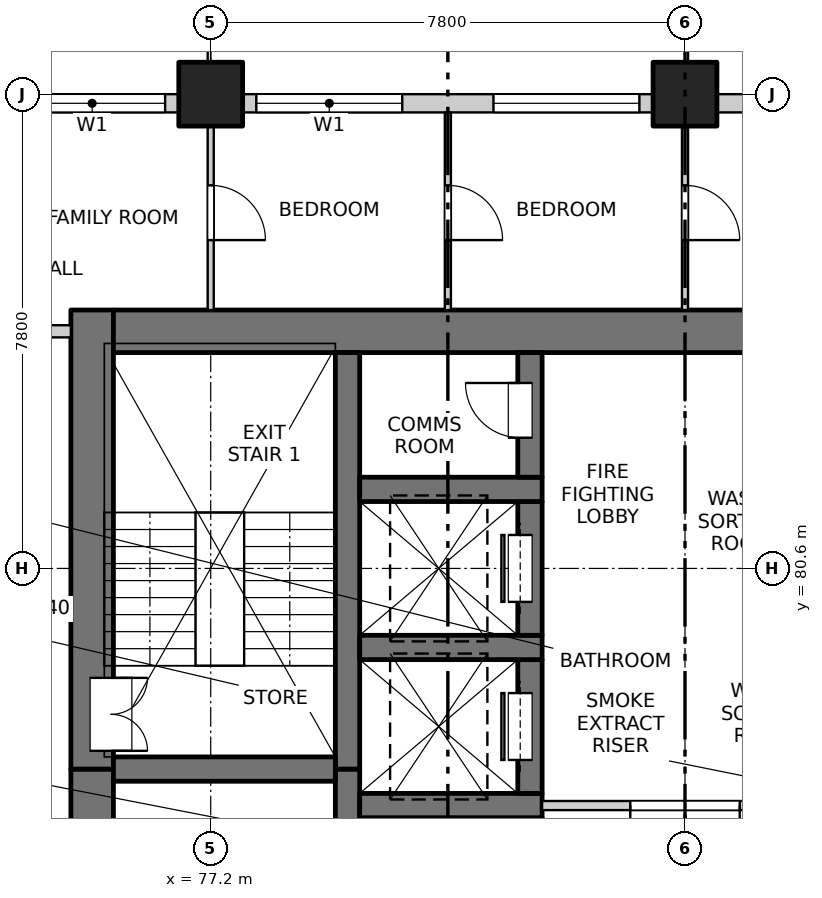
"""IFC4 building model, lengths in metres.
Left out: names, types, materials, properties, quantities, classifications, styles, units other than length and angle.
Written with IfcOpenShell. Run it as: python <this file> out.ifc"""

import sys

from ifc_helpers import new_model, si_unit, direction, frame, frame_2d, origin, origin_2d, place, context, subcontext, project, spatial, rectangle, extrude, element, fill, save


model = new_model("IFC4")
c1 = context("Model", 3, precision=1e-05, world=origin(), true_north=direction((0.0, 1.0)))
c2 = subcontext(c1, "Body", "Model", "MODEL_VIEW")
j1 = project(units=[si_unit("LENGTHUNIT", "METRE"), si_unit("PLANEANGLEUNIT", "RADIAN")], contexts=[c1])
p1 = place(None, origin())
s1 = spatial("IfcSite", under=j1, at=p1, CompositionType="ELEMENT")
p2 = place(p1, origin())
s2 = spatial("IfcBuilding", under=s1, at=p2, CompositionType="ELEMENT")
p3 = place(p2, frame((0.0, 0.0, 36.5)))
s3 = spatial("IfcBuildingStorey", under=s2, at=p3, CompositionType="ELEMENT", Elevation=36.5)
for number, where, z_axis, x_axis in (
    (1, (77.2, 88.4, -0.25), (0.0, 0.0, 1.0), (1.0, 0.0, 0.0)),
    (2, (85.0, 88.4, -0.25), (0.0, 0.0, 1.0), (1.0, 0.0, 0.0)),
):
    element("IfcColumn", number, at=place(p3, frame(where, z_axis=z_axis, x_axis=x_axis)), inside=s3, PredefinedType="COLUMN", context=c2, shape_type="SweptSolid", body=[
        extrude(rectangle(XDim=1.05, YDim=1.05, at=origin_2d()), origin(), (0.0, 0.0, 1.0), 3.4),
    ])
p4 = place(p3, frame((75.25, 54.9, -0.25), z_axis=(0.0, 0.0, 1.0), x_axis=(0.0, 1.0, 0.0)))
e3 = element("IfcWall", 3, at=p4, inside=s3, PredefinedType="SOLIDWALL", context=c2, shape_type="SweptSolid", body=[
    extrude(rectangle(XDim=22.4, YDim=0.7, at=frame_2d((11.2, 0.0))), origin(), (0.0, 0.0, 1.0), 3.4),
])
p5 = place(p4, frame((7.55, 0.0, 0.25)))
e4 = element("IfcOpeningElement", 4, at=p5, cuts=e3, PredefinedType="OPENING", context=c2, shape_type="SweptSolid", body=[
    extrude(rectangle(XDim=0.9, YDim=2.1, at=frame_2d((0.45, 1.05))), frame((0.0, 0.36, 0.0), z_axis=(0.0, -1.0, 0.0), x_axis=(1.0, 0.0, 0.0)), (0.0, 0.0, 1.0), 0.72),
])
p6 = place(p4, frame((10.85, 0.0, 0.25)))
e5 = element("IfcOpeningElement", 5, at=p6, cuts=e3, PredefinedType="OPENING", context=c2, shape_type="SweptSolid", body=[
    extrude(rectangle(XDim=0.9, YDim=2.1, at=frame_2d((0.45, 1.05))), frame((0.0, 0.36, 0.0), z_axis=(0.0, -1.0, 0.0), x_axis=(1.0, 0.0, 0.0)), (0.0, 0.0, 1.0), 0.72),
])
p7 = place(p4, frame((13.85, 0.0, 0.25)))
e6 = element("IfcOpeningElement", 6, at=p7, cuts=e3, PredefinedType="OPENING", context=c2, shape_type="SweptSolid", body=[
    extrude(rectangle(XDim=0.9, YDim=2.1, at=frame_2d((0.45, 1.05))), frame((0.0, 0.36, 0.0), z_axis=(0.0, -1.0, 0.0), x_axis=(1.0, 0.0, 0.0)), (0.0, 0.0, 1.0), 0.72),
])
p8 = place(p4, frame((16.85, 0.0, 0.25)))
e7 = element("IfcOpeningElement", 7, at=p8, cuts=e3, PredefinedType="OPENING", context=c2, shape_type="SweptSolid", body=[
    extrude(rectangle(XDim=0.9, YDim=2.1, at=frame_2d((0.45, 1.05))), frame((0.0, 0.36, 0.0), z_axis=(0.0, -1.0, 0.0), x_axis=(1.0, 0.0, 0.0)), (0.0, 0.0, 1.0), 0.72),
])
p9 = place(p4, frame((20.15, 0.0, 0.25)))
e8 = element("IfcOpeningElement", 8, at=p9, cuts=e3, PredefinedType="OPENING", context=c2, shape_type="SweptSolid", body=[
    extrude(rectangle(XDim=0.9, YDim=2.1, at=frame_2d((0.45, 1.05))), frame((0.0, 0.36, 0.0), z_axis=(0.0, -1.0, 0.0), x_axis=(1.0, 0.0, 0.0)), (0.0, 0.0, 1.0), 0.72),
])
p10 = place(p3, frame((75.25, 77.3, -0.25), z_axis=(0.0, 0.0, 1.0), x_axis=(0.0, 1.0, 0.0)))
e9 = element("IfcWall", 9, at=p10, inside=s3, PredefinedType="SOLIDWALL", context=c2, shape_type="SweptSolid", body=[
    extrude(rectangle(XDim=7.55, YDim=0.7, at=frame_2d((3.775, 0.0))), origin(), (0.0, 0.0, 1.0), 3.4),
])
p11 = place(p10, frame((0.3, 0.0, 0.25)))
e10 = element("IfcOpeningElement", 10, at=p11, cuts=e9, PredefinedType="OPENING", context=c2, shape_type="SweptSolid", body=[
    extrude(rectangle(XDim=1.2, YDim=2.1, at=frame_2d((0.6, 1.05))), frame((0.0, 0.36, 0.0), z_axis=(0.0, -1.0, 0.0), x_axis=(1.0, 0.0, 0.0)), (0.0, 0.0, 1.0), 0.72),
])
p12 = place(p3, frame((75.6, 84.5, -0.25), z_axis=(0.0, 0.0, 1.0), x_axis=(1.0, 0.0, 0.0)))
e11 = element("IfcWall", 11, at=p12, inside=s3, PredefinedType="SOLIDWALL", context=c2, shape_type="SweptSolid", body=[
    extrude(rectangle(XDim=18.8, YDim=0.7, at=frame_2d((9.4, 0.0))), origin(), (0.0, 0.0, 1.0), 3.4),
])
p13 = place(p3, frame((79.45, 60.9, -0.25), z_axis=(0.0, 0.0, 1.0), x_axis=(0.0, 1.0, 0.0)))
e12 = element("IfcWall", 12, at=p13, inside=s3, PredefinedType="SOLIDWALL", context=c2, shape_type="SweptSolid", body=[
    extrude(rectangle(XDim=16.4, YDim=0.4, at=frame_2d((8.2, 0.0))), origin(), (0.0, 0.0, 1.0), 3.4),
])
p14 = place(p3, frame((79.45, 77.3, -0.25), z_axis=(0.0, 0.0, 1.0), x_axis=(0.0, 1.0, 0.0)))
e13 = element("IfcWall", 13, at=p14, inside=s3, PredefinedType="SOLIDWALL", context=c2, shape_type="SweptSolid", body=[
    extrude(rectangle(XDim=6.85, YDim=0.4, at=frame_2d((3.425, 0.0))), origin(), (0.0, 0.0, 1.0), 3.4),
])
p15 = place(p3, frame((82.45, 74.3, -0.25), z_axis=(0.0, 0.0, 1.0), x_axis=(0.0, 1.0, 0.0)))
e14 = element("IfcWall", 14, at=p15, inside=s3, PredefinedType="SOLIDWALL", context=c2, shape_type="SweptSolid", body=[
    extrude(rectangle(XDim=2.2, YDim=0.4, at=frame_2d((1.1, 0.0))), origin(), (0.0, 0.0, 1.0), 3.4),
])
p16 = place(p15, frame((0.55, 0.0, 0.25)))
e15 = element("IfcOpeningElement", 15, at=p16, cuts=e14, PredefinedType="OPENING", context=c2, shape_type="SweptSolid", body=[
    extrude(rectangle(XDim=1.1, YDim=2.1, at=frame_2d((0.55, 1.05))), frame((0.0, 0.21, 0.0), z_axis=(0.0, -1.0, 0.0), x_axis=(1.0, 0.0, 0.0)), (0.0, 0.0, 1.0), 0.42),
])
p17 = place(p3, frame((79.65, 76.7, -0.25), z_axis=(0.0, 0.0, 1.0), x_axis=(1.0, 0.0, 0.0)))
e16 = element("IfcWall", 16, at=p17, inside=s3, PredefinedType="SOLIDWALL", context=c2, shape_type="SweptSolid", body=[
    extrude(rectangle(XDim=3.0, YDim=0.4, at=frame_2d((1.5, 0.0))), origin(), (0.0, 0.0, 1.0), 3.4),
])
p18 = place(p3, frame((82.45, 76.9, -0.25), z_axis=(0.0, 0.0, 1.0), x_axis=(0.0, 1.0, 0.0)))
e17 = element("IfcWall", 17, at=p18, inside=s3, PredefinedType="SOLIDWALL", context=c2, shape_type="SweptSolid", body=[
    extrude(rectangle(XDim=2.2, YDim=0.4, at=frame_2d((1.1, 0.0))), origin(), (0.0, 0.0, 1.0), 3.4),
])
p19 = place(p18, frame((0.55, 0.0, 0.25)))
e18 = element("IfcOpeningElement", 18, at=p19, cuts=e17, PredefinedType="OPENING", context=c2, shape_type="SweptSolid", body=[
    extrude(rectangle(XDim=1.1, YDim=2.1, at=frame_2d((0.55, 1.05))), frame((0.0, 0.21, 0.0), z_axis=(0.0, -1.0, 0.0), x_axis=(1.0, 0.0, 0.0)), (0.0, 0.0, 1.0), 0.42),
])
p20 = place(p3, frame((79.65, 79.3, -0.25), z_axis=(0.0, 0.0, 1.0), x_axis=(1.0, 0.0, 0.0)))
e19 = element("IfcWall", 19, at=p20, inside=s3, PredefinedType="SOLIDWALL", context=c2, shape_type="SweptSolid", body=[
    extrude(rectangle(XDim=3.0, YDim=0.4, at=frame_2d((1.5, 0.0))), origin(), (0.0, 0.0, 1.0), 3.4),
])
p21 = place(p3, frame((82.45, 79.5, -0.25), z_axis=(0.0, 0.0, 1.0), x_axis=(0.0, 1.0, 0.0)))
e20 = element("IfcWall", 20, at=p21, inside=s3, PredefinedType="SOLIDWALL", context=c2, shape_type="SweptSolid", body=[
    extrude(rectangle(XDim=2.2, YDim=0.4, at=frame_2d((1.1, 0.0))), origin(), (0.0, 0.0, 1.0), 3.4),
])
p22 = place(p21, frame((0.55, 0.0, 0.25)))
e21 = element("IfcOpeningElement", 21, at=p22, cuts=e20, PredefinedType="OPENING", context=c2, shape_type="SweptSolid", body=[
    extrude(rectangle(XDim=1.1, YDim=2.1, at=frame_2d((0.55, 1.05))), frame((0.0, 0.21, 0.0), z_axis=(0.0, -1.0, 0.0), x_axis=(1.0, 0.0, 0.0)), (0.0, 0.0, 1.0), 0.42),
])
p23 = place(p3, frame((79.65, 81.9, -0.25), z_axis=(0.0, 0.0, 1.0), x_axis=(1.0, 0.0, 0.0)))
e22 = element("IfcWall", 22, at=p23, inside=s3, PredefinedType="SOLIDWALL", context=c2, shape_type="SweptSolid", body=[
    extrude(rectangle(XDim=3.0, YDim=0.4, at=frame_2d((1.5, 0.0))), origin(), (0.0, 0.0, 1.0), 3.4),
])
p24 = place(p3, frame((82.45, 82.1, -0.25), z_axis=(0.0, 0.0, 1.0), x_axis=(0.0, 1.0, 0.0)))
e23 = element("IfcWall", 23, at=p24, inside=s3, PredefinedType="SOLIDWALL", context=c2, shape_type="SweptSolid", body=[
    extrude(rectangle(XDim=2.05, YDim=0.4, at=frame_2d((1.025, 0.0))), origin(), (0.0, 0.0, 1.0), 3.4),
])
p25 = place(p24, frame((0.65, 0.0, 0.25)))
e24 = element("IfcOpeningElement", 24, at=p25, cuts=e23, PredefinedType="OPENING", context=c2, shape_type="SweptSolid", body=[
    extrude(rectangle(XDim=0.9, YDim=2.1, at=frame_2d((0.45, 1.05))), frame((0.0, 0.21, 0.0), z_axis=(0.0, -1.0, 0.0), x_axis=(1.0, 0.0, 0.0)), (0.0, 0.0, 1.0), 0.42),
])
p26 = place(p3, frame((75.6, 77.3, -0.25), z_axis=(0.0, 0.0, 1.0), x_axis=(1.0, 0.0, 0.0)))
e25 = element("IfcWall", 25, at=p26, inside=s3, PredefinedType="SOLIDWALL", context=c2, shape_type="SweptSolid", body=[
    extrude(rectangle(XDim=3.65, YDim=0.4, at=frame_2d((1.825, 0.0))), origin(), (0.0, 0.0, 1.0), 3.4),
])
p27 = place(p3, frame((69.925, 88.25, 0.0), z_axis=(0.0, 0.0, 1.0), x_axis=(1.0, 0.0, 0.0)))
e26 = element("IfcWall", 26, at=p27, inside=s3, PredefinedType="SOLIDWALL", context=c2, shape_type="SweptSolid", body=[
    extrude(rectangle(XDim=6.75, YDim=0.3, at=frame_2d((3.375, 0.0))), origin(), (0.0, 0.0, 1.0), 2.7),
])
p28 = place(p27, frame((0.525, 0.0, 0.0)))
e27 = element("IfcOpeningElement", 27, at=p28, cuts=e26, PredefinedType="OPENING", context=c2, shape_type="SweptSolid", body=[
    extrude(rectangle(XDim=1.8, YDim=2.4, at=frame_2d((0.9, 1.2))), frame((0.0, 0.16, 0.0), z_axis=(0.0, -1.0, 0.0), x_axis=(1.0, 0.0, 0.0)), (0.0, 0.0, 1.0), 0.32),
])
p29 = place(p27, frame((4.125, 0.0, 0.9)))
e28 = element("IfcOpeningElement", 28, at=p29, cuts=e26, PredefinedType="OPENING", context=c2, shape_type="SweptSolid", body=[
    extrude(rectangle(XDim=2.4, YDim=1.8, at=frame_2d((1.2, 0.9))), frame((0.0, 0.16, 0.0), z_axis=(0.0, -1.0, 0.0), x_axis=(1.0, 0.0, 0.0)), (0.0, 0.0, 1.0), 0.32),
])
p30 = place(p3, frame((77.725, 88.25, 0.0), z_axis=(0.0, 0.0, 1.0), x_axis=(1.0, 0.0, 0.0)))
e29 = element("IfcWall", 29, at=p30, inside=s3, PredefinedType="SOLIDWALL", context=c2, shape_type="SweptSolid", body=[
    extrude(rectangle(XDim=6.75, YDim=0.3, at=frame_2d((3.375, 0.0))), origin(), (0.0, 0.0, 1.0), 2.7),
])
p31 = place(p30, frame((0.225, 0.0, 0.9)))
e30 = element("IfcOpeningElement", 30, at=p31, cuts=e29, PredefinedType="OPENING", context=c2, shape_type="SweptSolid", body=[
    extrude(rectangle(XDim=2.4, YDim=1.8, at=frame_2d((1.2, 0.9))), frame((0.0, 0.16, 0.0), z_axis=(0.0, -1.0, 0.0), x_axis=(1.0, 0.0, 0.0)), (0.0, 0.0, 1.0), 0.32),
])
p32 = place(p30, frame((4.125, 0.0, 0.9)))
e31 = element("IfcOpeningElement", 31, at=p32, cuts=e29, PredefinedType="OPENING", context=c2, shape_type="SweptSolid", body=[
    extrude(rectangle(XDim=2.4, YDim=1.8, at=frame_2d((1.2, 0.9))), frame((0.0, 0.16, 0.0), z_axis=(0.0, -1.0, 0.0), x_axis=(1.0, 0.0, 0.0)), (0.0, 0.0, 1.0), 0.32),
])
p33 = place(p3, frame((85.525, 88.25, 0.0), z_axis=(0.0, 0.0, 1.0), x_axis=(1.0, 0.0, 0.0)))
e32 = element("IfcWall", 32, at=p33, inside=s3, PredefinedType="SOLIDWALL", context=c2, shape_type="SweptSolid", body=[
    extrude(rectangle(XDim=6.75, YDim=0.3, at=frame_2d((3.375, 0.0))), origin(), (0.0, 0.0, 1.0), 2.7),
])
p34 = place(p33, frame((0.525, 0.0, 0.0)))
e33 = element("IfcOpeningElement", 33, at=p34, cuts=e32, PredefinedType="OPENING", context=c2, shape_type="SweptSolid", body=[
    extrude(rectangle(XDim=1.8, YDim=2.4, at=frame_2d((0.9, 1.2))), frame((0.0, 0.16, 0.0), z_axis=(0.0, -1.0, 0.0), x_axis=(1.0, 0.0, 0.0)), (0.0, 0.0, 1.0), 0.32),
])
p35 = place(p33, frame((4.125, 0.0, 0.9)))
e34 = element("IfcOpeningElement", 34, at=p35, cuts=e32, PredefinedType="OPENING", context=c2, shape_type="SweptSolid", body=[
    extrude(rectangle(XDim=2.4, YDim=1.8, at=frame_2d((1.2, 0.9))), frame((0.0, 0.16, 0.0), z_axis=(0.0, -1.0, 0.0), x_axis=(1.0, 0.0, 0.0)), (0.0, 0.0, 1.0), 0.32),
])
p36 = place(p3, frame((82.65, 76.7, 0.0), z_axis=(0.0, 0.0, 1.0), x_axis=(1.0, 0.0, 0.0)))
e35 = element("IfcWall", 35, at=p36, inside=s3, PredefinedType="PARTITIONING", context=c2, shape_type="SweptSolid", body=[
    extrude(rectangle(XDim=4.7, YDim=0.15, at=frame_2d((2.35, 0.0))), origin(), (0.0, 0.0, 1.0), 3.15),
])
p37 = place(p36, frame((1.45, 0.0, 0.0)))
e36 = element("IfcOpeningElement", 36, at=p37, cuts=e35, PredefinedType="OPENING", context=c2, shape_type="SweptSolid", body=[
    extrude(rectangle(XDim=1.8, YDim=2.1, at=frame_2d((0.9, 1.05))), frame((0.0, 0.085, 0.0), z_axis=(0.0, -1.0, 0.0), x_axis=(1.0, 0.0, 0.0)), (0.0, 0.0, 1.0), 0.17),
])
p38 = place(p3, frame((73.2, 84.5, 0.0), z_axis=(0.0, 0.0, 1.0), x_axis=(1.0, 0.0, 0.0)))
e37 = element("IfcWall", 37, at=p38, inside=s3, PredefinedType="PARTITIONING", context=c2, shape_type="SweptSolid", body=[
    extrude(rectangle(XDim=1.7, YDim=0.2, at=frame_2d((0.85, 0.0))), origin(), (0.0, 0.0, 1.0), 3.15),
])
p39 = place(p3, frame((77.2, 84.85, 0.0), z_axis=(0.0, 0.0, 1.0), x_axis=(0.0, 1.0, 0.0)))
e38 = element("IfcWall", 38, at=p39, inside=s3, PredefinedType="PARTITIONING", context=c2, shape_type="SweptSolid", body=[
    extrude(rectangle(XDim=3.25, YDim=0.1, at=frame_2d((1.625, 0.0))), origin(), (0.0, 0.0, 1.0), 3.15),
])
p40 = place(p39, frame((1.15, 0.0, 0.0)))
e39 = element("IfcOpeningElement", 39, at=p40, cuts=e38, PredefinedType="OPENING", context=c2, shape_type="SweptSolid", body=[
    extrude(rectangle(XDim=0.9, YDim=2.1, at=frame_2d((0.45, 1.05))), frame((0.0, 0.06, 0.0), z_axis=(0.0, -1.0, 0.0), x_axis=(1.0, 0.0, 0.0)), (0.0, 0.0, 1.0), 0.12),
])
p41 = place(p3, frame((81.1, 84.85, 0.0), z_axis=(0.0, 0.0, 1.0), x_axis=(0.0, 1.0, 0.0)))
e40 = element("IfcWall", 40, at=p41, inside=s3, PredefinedType="PARTITIONING", context=c2, shape_type="SweptSolid", body=[
    extrude(rectangle(XDim=3.25, YDim=0.1, at=frame_2d((1.625, 0.0))), origin(), (0.0, 0.0, 1.0), 3.15),
])
p42 = place(p41, frame((1.15, 0.0, 0.0)))
e41 = element("IfcOpeningElement", 41, at=p42, cuts=e40, PredefinedType="OPENING", context=c2, shape_type="SweptSolid", body=[
    extrude(rectangle(XDim=0.9, YDim=2.1, at=frame_2d((0.45, 1.05))), frame((0.0, 0.06, 0.0), z_axis=(0.0, -1.0, 0.0), x_axis=(1.0, 0.0, 0.0)), (0.0, 0.0, 1.0), 0.12),
])
p43 = place(p3, frame((85.0, 84.85, 0.0), z_axis=(0.0, 0.0, 1.0), x_axis=(0.0, 1.0, 0.0)))
e42 = element("IfcWall", 42, at=p43, inside=s3, PredefinedType="PARTITIONING", context=c2, shape_type="SweptSolid", body=[
    extrude(rectangle(XDim=3.25, YDim=0.1, at=frame_2d((1.625, 0.0))), origin(), (0.0, 0.0, 1.0), 3.15),
])
p44 = place(p43, frame((1.15, 0.0, 0.0)))
e43 = element("IfcOpeningElement", 43, at=p44, cuts=e42, PredefinedType="OPENING", context=c2, shape_type="SweptSolid", body=[
    extrude(rectangle(XDim=0.9, YDim=2.1, at=frame_2d((0.45, 1.05))), frame((0.0, 0.06, 0.0), z_axis=(0.0, -1.0, 0.0), x_axis=(1.0, 0.0, 0.0)), (0.0, 0.0, 1.0), 0.12),
])
p45 = place(p29, origin())
e44 = element("IfcWindow", 44, at=p45, inside=s3, PartitioningType="DOUBLE_PANEL_VERTICAL", PredefinedType="WINDOW", context=c2, shape_type="SweptSolid", body=[
    extrude(rectangle(XDim=2.4, YDim=1.8, at=frame_2d((1.2, 0.9))), frame((0.0, 0.03, 0.0), z_axis=(0.0, -1.0, 0.0), x_axis=(1.0, 0.0, 0.0)), (0.0, 0.0, 1.0), 0.06),
])
fill(e28, e44)
p46 = place(p31, origin())
e45 = element("IfcWindow", 45, at=p46, inside=s3, PartitioningType="DOUBLE_PANEL_VERTICAL", PredefinedType="WINDOW", context=c2, shape_type="SweptSolid", body=[
    extrude(rectangle(XDim=2.4, YDim=1.8, at=frame_2d((1.2, 0.9))), frame((0.0, 0.03, 0.0), z_axis=(0.0, -1.0, 0.0), x_axis=(1.0, 0.0, 0.0)), (0.0, 0.0, 1.0), 0.06),
])
fill(e30, e45)
p47 = place(p32, origin())
e46 = element("IfcWindow", 46, at=p47, inside=s3, PartitioningType="DOUBLE_PANEL_VERTICAL", PredefinedType="WINDOW", context=c2, shape_type="SweptSolid", body=[
    extrude(rectangle(XDim=2.4, YDim=1.8, at=frame_2d((1.2, 0.9))), frame((0.0, 0.03, 0.0), z_axis=(0.0, -1.0, 0.0), x_axis=(1.0, 0.0, 0.0)), (0.0, 0.0, 1.0), 0.06),
])
fill(e31, e46)
p48 = place(p37, origin())
e47 = element("IfcDoor", 47, at=p48, inside=s3, OperationType="DOUBLE_DOOR_SINGLE_SWING", PredefinedType="DOOR", context=c2, shape_type="SweptSolid", body=[
    extrude(rectangle(XDim=1.8, YDim=2.1, at=frame_2d((0.9, 1.05))), frame((0.0, 0.025, 0.0), z_axis=(0.0, -1.0, 0.0), x_axis=(1.0, 0.0, 0.0)), (0.0, 0.0, 1.0), 0.05),
])
fill(e36, e47)
p49 = place(p19, origin())
e48 = element("IfcDoor", 48, at=p49, inside=s3, OperationType="SLIDING_TO_LEFT", PredefinedType="DOOR", context=c2, shape_type="SweptSolid", body=[
    extrude(rectangle(XDim=1.1, YDim=2.1, at=frame_2d((0.55, 1.05))), frame((0.0, 0.185, 0.0), z_axis=(0.0, -1.0, 0.0), x_axis=(1.0, 0.0, 0.0)), (0.0, 0.0, 1.0), 0.05),
])
fill(e18, e48)
p50 = place(p11, origin())
e49 = element("IfcDoor", 49, at=p50, inside=s3, OperationType="DOUBLE_DOOR_SINGLE_SWING", PredefinedType="DOOR", context=c2, shape_type="SweptSolid", body=[
    extrude(rectangle(XDim=1.2, YDim=2.1, at=frame_2d((0.6, 1.05))), frame((0.0, -0.285, 0.0), z_axis=(0.0, -1.0, 0.0), x_axis=(1.0, 0.0, 0.0)), (0.0, 0.0, 1.0), 0.05),
])
fill(e10, e49)
p51 = place(p22, origin())
e50 = element("IfcDoor", 50, at=p51, inside=s3, OperationType="SLIDING_TO_LEFT", PredefinedType="DOOR", context=c2, shape_type="SweptSolid", body=[
    extrude(rectangle(XDim=1.1, YDim=2.1, at=frame_2d((0.55, 1.05))), frame((0.0, 0.185, 0.0), z_axis=(0.0, -1.0, 0.0), x_axis=(1.0, 0.0, 0.0)), (0.0, 0.0, 1.0), 0.05),
])
fill(e21, e50)
p52 = place(p25, origin())
e51 = element("IfcDoor", 51, at=p52, inside=s3, OperationType="SINGLE_SWING_RIGHT", PredefinedType="DOOR", context=c2, shape_type="SweptSolid", body=[
    extrude(rectangle(XDim=0.9, YDim=2.1, at=frame_2d((0.45, 1.05))), frame((0.0, 0.185, 0.0), z_axis=(0.0, -1.0, 0.0), x_axis=(1.0, 0.0, 0.0)), (0.0, 0.0, 1.0), 0.05),
])
fill(e24, e51)
p53 = place(p40, origin())
e52 = element("IfcDoor", 52, at=p53, inside=s3, OperationType="SINGLE_SWING_RIGHT", PredefinedType="DOOR", context=c2, shape_type="SweptSolid", body=[
    extrude(rectangle(XDim=0.9, YDim=2.1, at=frame_2d((0.45, 1.05))), frame((0.0, 0.025, 0.0), z_axis=(0.0, -1.0, 0.0), x_axis=(1.0, 0.0, 0.0)), (0.0, 0.0, 1.0), 0.05),
])
fill(e39, e52)
p54 = place(p42, origin())
e53 = element("IfcDoor", 53, at=p54, inside=s3, OperationType="SINGLE_SWING_RIGHT", PredefinedType="DOOR", context=c2, shape_type="SweptSolid", body=[
    extrude(rectangle(XDim=0.9, YDim=2.1, at=frame_2d((0.45, 1.05))), frame((0.0, 0.025, 0.0), z_axis=(0.0, -1.0, 0.0), x_axis=(1.0, 0.0, 0.0)), (0.0, 0.0, 1.0), 0.05),
])
fill(e41, e53)
p55 = place(p44, origin())
e54 = element("IfcDoor", 54, at=p55, inside=s3, OperationType="SINGLE_SWING_RIGHT", PredefinedType="DOOR", context=c2, shape_type="SweptSolid", body=[
    extrude(rectangle(XDim=0.9, YDim=2.1, at=frame_2d((0.45, 1.05))), frame((0.0, 0.025, 0.0), z_axis=(0.0, -1.0, 0.0), x_axis=(1.0, 0.0, 0.0)), (0.0, 0.0, 1.0), 0.05),
])
fill(e43, e54)
save(model, sys.argv[1])
